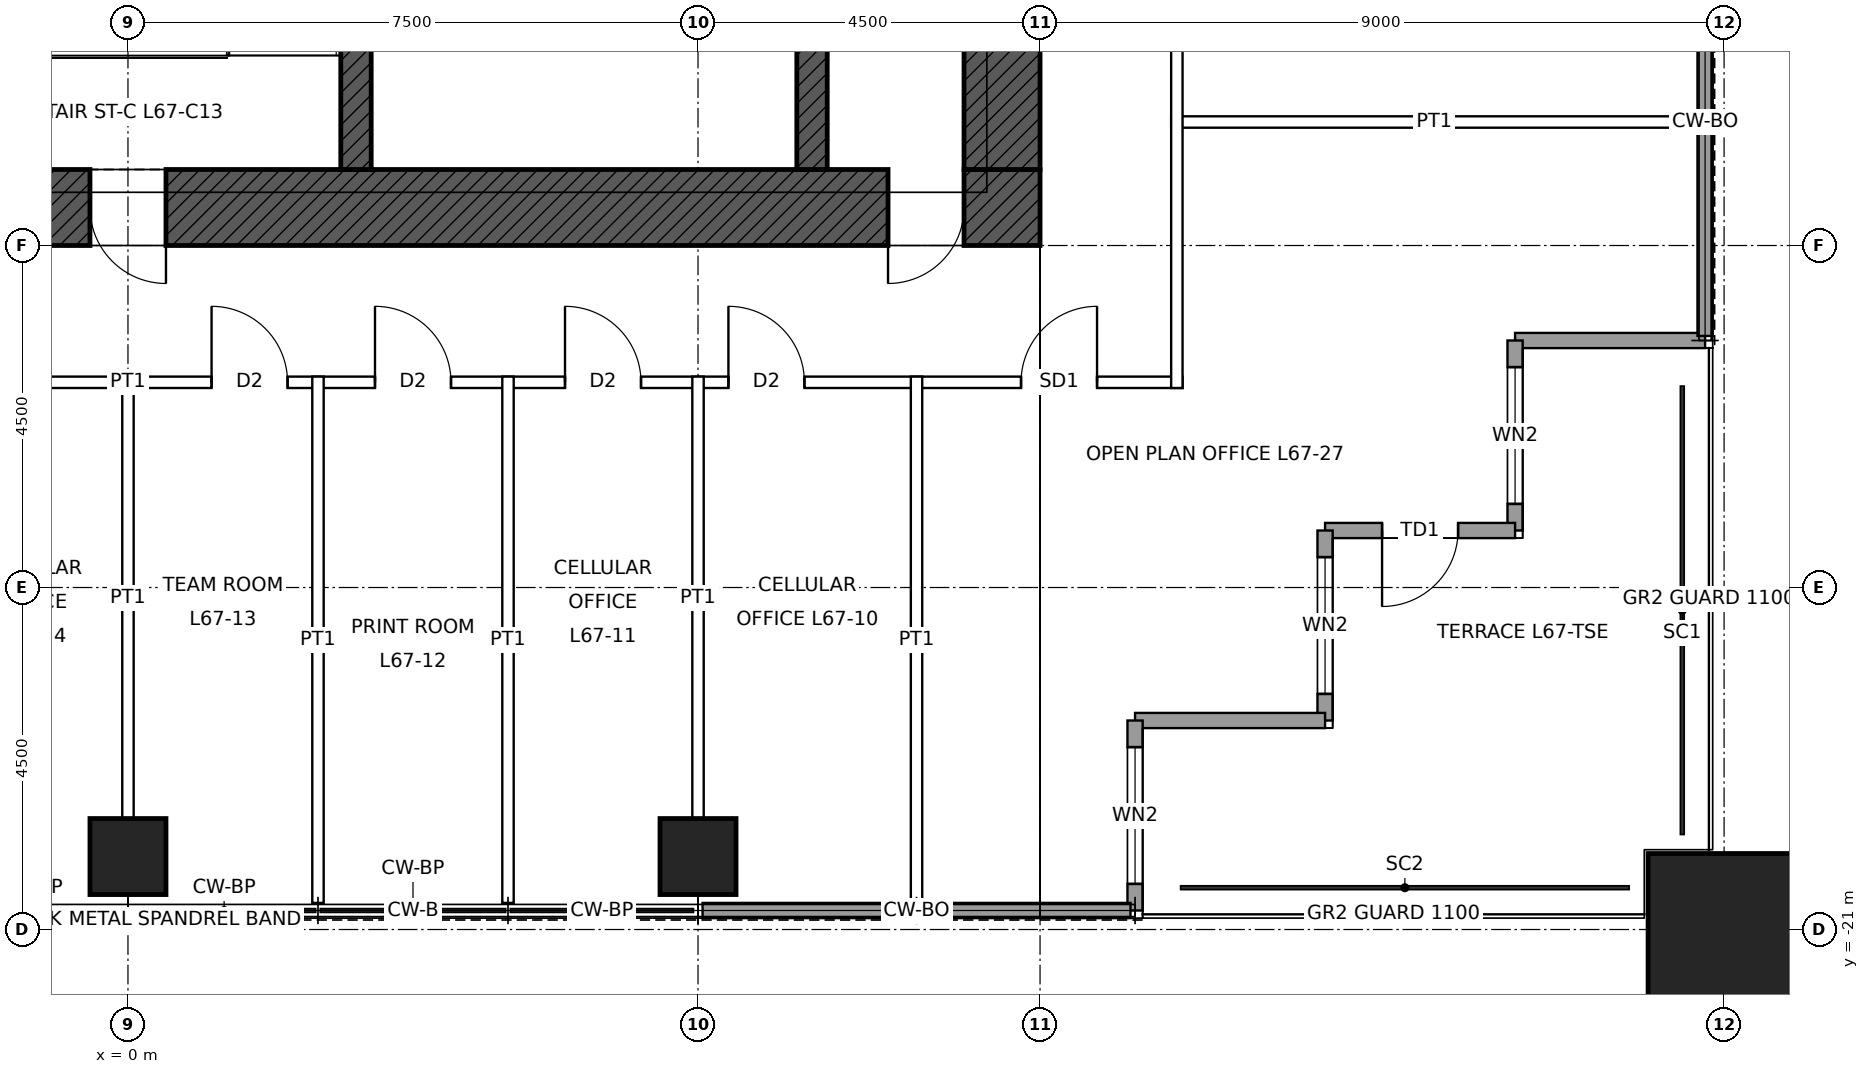
"""IFC4 building model, lengths in metres.
Left out: names, types, materials, properties, quantities, classifications, styles, units other than length and angle.
Written with IfcOpenShell. Run it as: python <this file> out.ifc"""

import sys

from ifc_helpers import new_model, si_unit, direction, frame, frame_2d, origin, origin_2d, place, context, subcontext, project, spatial, rectangle, hollow_rectangle, extrude, element, fill, save


model = new_model("IFC4")
c1 = context("Model", 3, precision=1e-05, world=origin(), true_north=direction((0.0, 1.0)))
c2 = subcontext(c1, "Body", "Model", "MODEL_VIEW")
j1 = project(units=[si_unit("LENGTHUNIT", "METRE"), si_unit("PLANEANGLEUNIT", "RADIAN")], contexts=[c1])
p1 = place(None, origin())
s1 = spatial("IfcSite", under=j1, at=p1, CompositionType="ELEMENT")
p2 = place(p1, origin())
s2 = spatial("IfcBuilding", under=s1, at=p2, CompositionType="ELEMENT")
p3 = place(p2, frame((0.0, 0.0, 303.9)))
s3 = spatial("IfcBuildingStorey", under=s2, at=p3, CompositionType="ELEMENT", Elevation=303.9)
p4 = place(p3, frame((21.0, -21.0, 0.0), z_axis=(0.0, 0.0, 1.0), x_axis=(1.0, 0.0, 0.0)))
e1 = element("IfcColumn", 1, at=p4, inside=s3, PredefinedType="COLUMN", context=c2, shape_type="SweptSolid", body=[
    extrude(hollow_rectangle(XDim=2.0, YDim=2.0, WallThickness=0.095, at=origin_2d()), origin(), (0.0, 0.0, 1.0), 4.0),
])
for number, where, z_axis, x_axis in (
    (2, (7.5, -20.04, 0.0), (0.0, 0.0, 1.0), (1.0, 0.0, 0.0)),
    (3, (0.0, -20.04, 0.0), (0.0, 0.0, 1.0), (1.0, 0.0, 0.0)),
):
    element("IfcColumn", number, at=place(p3, frame(where, z_axis=z_axis, x_axis=x_axis)), inside=s3, PredefinedType="COLUMN", context=c2, shape_type="SweptSolid", body=[
        extrude(hollow_rectangle(XDim=1.0, YDim=1.0, WallThickness=0.075, at=origin_2d()), origin(), (0.0, 0.0, 1.0), 4.0),
    ])
p5 = place(p3, frame((12.0, -11.5, 0.0), z_axis=(0.0, 0.0, 1.0), x_axis=(-1.0, 0.0, 0.0)))
e4 = element("IfcWall", 4, at=p5, inside=s3, PredefinedType="SHEAR", context=c2, shape_type="SweptSolid", body=[
    extrude(rectangle(XDim=24.0, YDim=1.0, at=frame_2d((12.0, 0.0))), origin(), (0.0, 0.0, 1.0), 4.0),
])
p6 = place(p5, frame((11.5, 0.0, 0.0)))
e5 = element("IfcOpeningElement", 5, at=p6, cuts=e4, PredefinedType="OPENING", context=c2, shape_type="SweptSolid", body=[
    extrude(rectangle(XDim=1.0, YDim=2.1, at=frame_2d((0.5, 1.05))), frame((0.0, 0.51, 0.0), z_axis=(0.0, -1.0, 0.0), x_axis=(1.0, 0.0, 0.0)), (0.0, 0.0, 1.0), 1.02),
])
p7 = place(p5, frame((1.0, 0.0, 0.0)))
e6 = element("IfcOpeningElement", 6, at=p7, cuts=e4, PredefinedType="OPENING", context=c2, shape_type="SweptSolid", body=[
    extrude(rectangle(XDim=1.0, YDim=2.4, at=frame_2d((0.5, 1.2))), frame((0.0, 0.51, 0.0), z_axis=(0.0, -1.0, 0.0), x_axis=(1.0, 0.0, 0.0)), (0.0, 0.0, 1.0), 1.02),
])
p8 = place(p3, frame((11.5, 11.0, 0.0), z_axis=(0.0, 0.0, 1.0), x_axis=(0.0, -1.0, 0.0)))
e7 = element("IfcWall", 7, at=p8, inside=s3, PredefinedType="SHEAR", context=c2, shape_type="SweptSolid", body=[
    extrude(rectangle(XDim=22.0, YDim=1.0, at=frame_2d((11.0, 0.0))), origin(), (0.0, 0.0, 1.0), 4.0),
])
p9 = place(p8, frame((10.5, 0.0, 0.0)))
e8 = element("IfcOpeningElement", 8, at=p9, cuts=e7, PredefinedType="OPENING", context=c2, shape_type="SweptSolid", body=[
    extrude(rectangle(XDim=1.0, YDim=2.4, at=frame_2d((0.5, 1.2))), frame((0.0, 0.51, 0.0), z_axis=(0.0, -1.0, 0.0), x_axis=(1.0, 0.0, 0.0)), (0.0, 0.0, 1.0), 1.02),
])
p10 = place(p3, frame((9.0, -11.0, 0.0), z_axis=(0.0, 0.0, 1.0), x_axis=(0.0, 1.0, 0.0)))
e9 = element("IfcWall", 9, at=p10, inside=s3, PredefinedType="SHEAR", context=c2, shape_type="SweptSolid", body=[
    extrude(rectangle(XDim=6.5, YDim=0.4, at=frame_2d((3.25, 0.0))), origin(), (0.0, 0.0, 1.0), 4.0),
])
p11 = place(p10, frame((4.25, 0.0, 0.0)))
e10 = element("IfcOpeningElement", 10, at=p11, cuts=e9, PredefinedType="OPENING", context=c2, shape_type="SweptSolid", body=[
    extrude(rectangle(XDim=1.0, YDim=2.1, at=frame_2d((0.5, 1.05))), frame((0.0, 0.21, 0.0), z_axis=(0.0, -1.0, 0.0), x_axis=(1.0, 0.0, 0.0)), (0.0, 0.0, 1.0), 0.42),
])
p12 = place(p3, frame((3.0, -11.0, 0.0), z_axis=(0.0, 0.0, 1.0), x_axis=(0.0, 1.0, 0.0)))
e11 = element("IfcWall", 11, at=p12, inside=s3, PredefinedType="SHEAR", context=c2, shape_type="SweptSolid", body=[
    extrude(rectangle(XDim=6.5, YDim=0.4, at=frame_2d((3.25, 0.0))), origin(), (0.0, 0.0, 1.0), 4.0),
])
p13 = place(p3, frame((20.75, -13.25, 0.0), z_axis=(0.0, 0.0, 1.0), x_axis=(-1.0, 0.0, 0.0)))
e12 = element("IfcWall", 12, at=p13, inside=s3, PredefinedType="SOLIDWALL", context=c2, shape_type="SweptSolid", body=[
    extrude(rectangle(XDim=2.5, YDim=0.2, at=frame_2d((1.25, 0.0))), origin(), (0.0, 0.0, 1.0), 3.85),
])
p14 = place(p3, frame((18.25, -13.25, 0.0), z_axis=(0.0, 0.0, 1.0), x_axis=(0.0, -1.0, 0.0)))
e13 = element("IfcWall", 13, at=p14, inside=s3, PredefinedType="SOLIDWALL", context=c2, shape_type="SweptSolid", body=[
    extrude(rectangle(XDim=2.5, YDim=0.2, at=frame_2d((1.25, 0.0))), origin(), (0.0, 0.0, 1.0), 3.85),
])
p15 = place(p14, frame((0.35, 0.0, 0.3)))
e14 = element("IfcOpeningElement", 14, at=p15, cuts=e13, PredefinedType="OPENING", context=c2, shape_type="SweptSolid", body=[
    extrude(rectangle(XDim=1.8, YDim=2.4, at=frame_2d((0.9, 1.2))), frame((0.0, 0.11, 0.0), z_axis=(0.0, -1.0, 0.0), x_axis=(1.0, 0.0, 0.0)), (0.0, 0.0, 1.0), 0.22),
])
p16 = place(p3, frame((18.25, -15.75, 0.0), z_axis=(0.0, 0.0, 1.0), x_axis=(-1.0, 0.0, 0.0)))
e15 = element("IfcWall", 15, at=p16, inside=s3, PredefinedType="SOLIDWALL", context=c2, shape_type="SweptSolid", body=[
    extrude(rectangle(XDim=2.5, YDim=0.2, at=frame_2d((1.25, 0.0))), origin(), (0.0, 0.0, 1.0), 3.317),
])
p17 = place(p16, frame((0.75, 0.0, 0.0)))
e16 = element("IfcOpeningElement", 16, at=p17, cuts=e15, PredefinedType="OPENING", context=c2, shape_type="SweptSolid", body=[
    extrude(rectangle(XDim=1.0, YDim=2.4, at=frame_2d((0.5, 1.2))), frame((0.0, 0.11, 0.0), z_axis=(0.0, -1.0, 0.0), x_axis=(1.0, 0.0, 0.0)), (0.0, 0.0, 1.0), 0.22),
])
p18 = place(p3, frame((15.75, -15.75, 0.0), z_axis=(0.0, 0.0, 1.0), x_axis=(0.0, -1.0, 0.0)))
e17 = element("IfcWall", 17, at=p18, inside=s3, PredefinedType="SOLIDWALL", context=c2, shape_type="SweptSolid", body=[
    extrude(rectangle(XDim=2.5, YDim=0.2, at=frame_2d((1.25, 0.0))), origin(), (0.0, 0.0, 1.0), 3.85),
])
p19 = place(p18, frame((0.35, 0.0, 0.3)))
e18 = element("IfcOpeningElement", 18, at=p19, cuts=e17, PredefinedType="OPENING", context=c2, shape_type="SweptSolid", body=[
    extrude(rectangle(XDim=1.8, YDim=2.4, at=frame_2d((0.9, 1.2))), frame((0.0, 0.11, 0.0), z_axis=(0.0, -1.0, 0.0), x_axis=(1.0, 0.0, 0.0)), (0.0, 0.0, 1.0), 0.22),
])
p20 = place(p3, frame((15.75, -18.25, 0.0), z_axis=(0.0, 0.0, 1.0), x_axis=(-1.0, 0.0, 0.0)))
e19 = element("IfcWall", 19, at=p20, inside=s3, PredefinedType="SOLIDWALL", context=c2, shape_type="SweptSolid", body=[
    extrude(rectangle(XDim=2.5, YDim=0.2, at=frame_2d((1.25, 0.0))), origin(), (0.0, 0.0, 1.0), 3.85),
])
p21 = place(p3, frame((13.25, -18.25, 0.0), z_axis=(0.0, 0.0, 1.0), x_axis=(0.0, -1.0, 0.0)))
e20 = element("IfcWall", 20, at=p21, inside=s3, PredefinedType="SOLIDWALL", context=c2, shape_type="SweptSolid", body=[
    extrude(rectangle(XDim=2.5, YDim=0.2, at=frame_2d((1.25, 0.0))), origin(), (0.0, 0.0, 1.0), 3.85),
])
p22 = place(p21, frame((0.35, 0.0, 0.3)))
e21 = element("IfcOpeningElement", 21, at=p22, cuts=e20, PredefinedType="OPENING", context=c2, shape_type="SweptSolid", body=[
    extrude(rectangle(XDim=1.8, YDim=2.4, at=frame_2d((0.9, 1.2))), frame((0.0, 0.11, 0.0), z_axis=(0.0, -1.0, 0.0), x_axis=(1.0, 0.0, 0.0)), (0.0, 0.0, 1.0), 0.22),
])
for number, where, z_axis, x_axis in (
    (22, (20.75, -7.56, 0.0), (0.0, 0.0, 1.0), (0.0, -1.0, 0.0)),
    (23, (20.75, -10.405, 0.0), (0.0, 0.0, 1.0), (0.0, -1.0, 0.0)),
    (24, (13.19, -20.75, 0.0), (0.0, 0.0, 1.0), (-1.0, 0.0, 0.0)),
    (25, (10.345, -20.75, 0.0), (0.0, 0.0, 1.0), (-1.0, 0.0, 0.0)),
):
    element("IfcWall", number, at=place(p3, frame(where, z_axis=z_axis, x_axis=x_axis)), inside=s3, PredefinedType="SOLIDWALL", context=c2, shape_type="SweptSolid", body=[
        extrude(rectangle(XDim=2.785, YDim=0.2, at=frame_2d((1.393, 0.0))), origin(), (0.0, 0.0, 1.0), 3.85),
    ])
p23 = place(p3, frame((-13.875, -13.8, 0.0), z_axis=(0.0, 0.0, 1.0), x_axis=(1.0, 0.0, 0.0)))
e26 = element("IfcWall", 26, at=p23, inside=s3, PredefinedType="PARTITIONING", context=c2, shape_type="SweptSolid", body=[
    extrude(rectangle(XDim=27.75, YDim=0.15, at=frame_2d((13.875, 0.0))), origin(), (0.0, 0.0, 1.0), 3.85),
])
p24 = place(p23, frame((21.775, 0.0, 0.0)))
e27 = element("IfcOpeningElement", 27, at=p24, cuts=e26, PredefinedType="OPENING", context=c2, shape_type="SweptSolid", body=[
    extrude(rectangle(XDim=1.0, YDim=2.1, at=frame_2d((0.5, 1.05))), frame((0.0, 0.085, 0.0), z_axis=(0.0, -1.0, 0.0), x_axis=(1.0, 0.0, 0.0)), (0.0, 0.0, 1.0), 0.17),
])
p25 = place(p23, frame((19.625, 0.0, 0.0)))
e28 = element("IfcOpeningElement", 28, at=p25, cuts=e26, PredefinedType="OPENING", context=c2, shape_type="SweptSolid", body=[
    extrude(rectangle(XDim=1.0, YDim=2.1, at=frame_2d((0.5, 1.05))), frame((0.0, 0.085, 0.0), z_axis=(0.0, -1.0, 0.0), x_axis=(1.0, 0.0, 0.0)), (0.0, 0.0, 1.0), 0.17),
])
p26 = place(p23, frame((17.125, 0.0, 0.0)))
e29 = element("IfcOpeningElement", 29, at=p26, cuts=e26, PredefinedType="OPENING", context=c2, shape_type="SweptSolid", body=[
    extrude(rectangle(XDim=1.0, YDim=2.1, at=frame_2d((0.5, 1.05))), frame((0.0, 0.085, 0.0), z_axis=(0.0, -1.0, 0.0), x_axis=(1.0, 0.0, 0.0)), (0.0, 0.0, 1.0), 0.17),
])
p27 = place(p23, frame((14.975, 0.0, 0.0)))
e30 = element("IfcOpeningElement", 30, at=p27, cuts=e26, PredefinedType="OPENING", context=c2, shape_type="SweptSolid", body=[
    extrude(rectangle(XDim=1.0, YDim=2.1, at=frame_2d((0.5, 1.05))), frame((0.0, 0.085, 0.0), z_axis=(0.0, -1.0, 0.0), x_axis=(1.0, 0.0, 0.0)), (0.0, 0.0, 1.0), 0.17),
])
p28 = place(p23, frame((11.775, 0.0, 0.0)))
e31 = element("IfcOpeningElement", 31, at=p28, cuts=e26, PredefinedType="OPENING", context=c2, shape_type="SweptSolid", body=[
    extrude(rectangle(XDim=1.0, YDim=2.1, at=frame_2d((0.5, 1.05))), frame((0.0, 0.085, 0.0), z_axis=(0.0, -1.0, 0.0), x_axis=(1.0, 0.0, 0.0)), (0.0, 0.0, 1.0), 0.17),
])
p29 = place(p23, frame((9.625, 0.0, 0.0)))
e32 = element("IfcOpeningElement", 32, at=p29, cuts=e26, PredefinedType="OPENING", context=c2, shape_type="SweptSolid", body=[
    extrude(rectangle(XDim=1.0, YDim=2.1, at=frame_2d((0.5, 1.05))), frame((0.0, 0.085, 0.0), z_axis=(0.0, -1.0, 0.0), x_axis=(1.0, 0.0, 0.0)), (0.0, 0.0, 1.0), 0.17),
])
p30 = place(p23, frame((7.125, 0.0, 0.0)))
e33 = element("IfcOpeningElement", 33, at=p30, cuts=e26, PredefinedType="OPENING", context=c2, shape_type="SweptSolid", body=[
    extrude(rectangle(XDim=1.0, YDim=2.1, at=frame_2d((0.5, 1.05))), frame((0.0, 0.085, 0.0), z_axis=(0.0, -1.0, 0.0), x_axis=(1.0, 0.0, 0.0)), (0.0, 0.0, 1.0), 0.17),
])
p31 = place(p23, frame((4.438, 0.0, 0.0)))
e34 = element("IfcOpeningElement", 34, at=p31, cuts=e26, PredefinedType="OPENING", context=c2, shape_type="SweptSolid", body=[
    extrude(rectangle(XDim=1.0, YDim=2.1, at=frame_2d((0.5, 1.05))), frame((0.0, 0.085, 0.0), z_axis=(0.0, -1.0, 0.0), x_axis=(1.0, 0.0, 0.0)), (0.0, 0.0, 1.0), 0.17),
])
p32 = place(p23, frame((25.625, 0.0, 0.0)))
e35 = element("IfcOpeningElement", 35, at=p32, cuts=e26, PredefinedType="OPENING", context=c2, shape_type="SweptSolid", body=[
    extrude(rectangle(XDim=1.0, YDim=2.4, at=frame_2d((0.5, 1.2))), frame((0.0, 0.085, 0.0), z_axis=(0.0, -1.0, 0.0), x_axis=(1.0, 0.0, 0.0)), (0.0, 0.0, 1.0), 0.17),
])
p33 = place(p23, frame((1.288, 0.0, 0.0)))
e36 = element("IfcOpeningElement", 36, at=p33, cuts=e26, PredefinedType="OPENING", context=c2, shape_type="SweptSolid", body=[
    extrude(rectangle(XDim=1.0, YDim=2.4, at=frame_2d((0.5, 1.2))), frame((0.0, 0.085, 0.0), z_axis=(0.0, -1.0, 0.0), x_axis=(1.0, 0.0, 0.0)), (0.0, 0.0, 1.0), 0.17),
])
p34 = place(p3, frame((13.725, -10.375, 0.0), z_axis=(0.0, 0.0, 1.0), x_axis=(1.0, 0.0, 0.0)))
e37 = element("IfcWall", 37, at=p34, inside=s3, PredefinedType="PARTITIONING", context=c2, shape_type="SweptSolid", body=[
    extrude(rectangle(XDim=6.925, YDim=0.15, at=frame_2d((3.462, 0.0))), origin(), (0.0, 0.0, 1.0), 3.85),
])
p35 = place(p3, frame((0.0, -19.54, 0.0), z_axis=(0.0, 0.0, 1.0), x_axis=(0.0, 1.0, 0.0)))
e38 = element("IfcWall", 38, at=p35, inside=s3, PredefinedType="PARTITIONING", context=c2, shape_type="SweptSolid", body=[
    extrude(rectangle(XDim=5.815, YDim=0.15, at=frame_2d((2.907, 0.0))), origin(), (0.0, 0.0, 1.0), 3.243),
])
for number, where, z_axis, x_axis in (
    (39, (2.5, -20.65, 0.0), (0.0, 0.0, 1.0), (0.0, 1.0, 0.0)),
    (40, (5.0, -20.65, 0.0), (0.0, 0.0, 1.0), (0.0, 1.0, 0.0)),
):
    element("IfcWall", number, at=place(p3, frame(where, z_axis=z_axis, x_axis=x_axis)), inside=s3, PredefinedType="PARTITIONING", context=c2, shape_type="SweptSolid", body=[
        extrude(rectangle(XDim=6.925, YDim=0.15, at=frame_2d((3.462, 0.0))), origin(), (0.0, 0.0, 1.0), 3.85),
    ])
p36 = place(p3, frame((7.5, -19.54, 0.0), z_axis=(0.0, 0.0, 1.0), x_axis=(0.0, 1.0, 0.0)))
e41 = element("IfcWall", 41, at=p36, inside=s3, PredefinedType="PARTITIONING", context=c2, shape_type="SweptSolid", body=[
    extrude(rectangle(XDim=5.815, YDim=0.15, at=frame_2d((2.907, 0.0))), origin(), (0.0, 0.0, 1.0), 3.243),
])
p37 = place(p3, frame((10.375, -20.65, 0.0), z_axis=(0.0, 0.0, 1.0), x_axis=(0.0, 1.0, 0.0)))
e42 = element("IfcWall", 42, at=p37, inside=s3, PredefinedType="PARTITIONING", context=c2, shape_type="SweptSolid", body=[
    extrude(rectangle(XDim=6.925, YDim=0.15, at=frame_2d((3.462, 0.0))), origin(), (0.0, 0.0, 1.0), 3.85),
])
p38 = place(p3, frame((13.8, -13.875, 0.0), z_axis=(0.0, 0.0, 1.0), x_axis=(0.0, 1.0, 0.0)))
e43 = element("IfcWall", 43, at=p38, inside=s3, PredefinedType="PARTITIONING", context=c2, shape_type="SweptSolid", body=[
    extrude(rectangle(XDim=13.95, YDim=0.15, at=frame_2d((6.975, 0.0))), origin(), (0.0, 0.0, 1.0), 3.85),
])
p39 = place(p38, frame((11.775, 0.0, 0.0)))
e44 = element("IfcOpeningElement", 44, at=p39, cuts=e43, PredefinedType="OPENING", context=c2, shape_type="SweptSolid", body=[
    extrude(rectangle(XDim=1.0, YDim=2.1, at=frame_2d((0.5, 1.05))), frame((0.0, 0.085, 0.0), z_axis=(0.0, -1.0, 0.0), x_axis=(1.0, 0.0, 0.0)), (0.0, 0.0, 1.0), 0.17),
])
p40 = place(p38, frame((9.625, 0.0, 0.0)))
e45 = element("IfcOpeningElement", 45, at=p40, cuts=e43, PredefinedType="OPENING", context=c2, shape_type="SweptSolid", body=[
    extrude(rectangle(XDim=1.0, YDim=2.1, at=frame_2d((0.5, 1.05))), frame((0.0, 0.085, 0.0), z_axis=(0.0, -1.0, 0.0), x_axis=(1.0, 0.0, 0.0)), (0.0, 0.0, 1.0), 0.17),
])
p41 = place(p38, frame((5.688, 0.0, 0.0)))
e46 = element("IfcOpeningElement", 46, at=p41, cuts=e43, PredefinedType="OPENING", context=c2, shape_type="SweptSolid", body=[
    extrude(rectangle(XDim=1.0, YDim=2.1, at=frame_2d((0.5, 1.05))), frame((0.0, 0.085, 0.0), z_axis=(0.0, -1.0, 0.0), x_axis=(1.0, 0.0, 0.0)), (0.0, 0.0, 1.0), 0.17),
])
p42 = place(p15, origin())
e47 = element("IfcWindow", 47, at=p42, inside=s3, PartitioningType="SINGLE_PANEL", PredefinedType="WINDOW", context=c2, shape_type="SweptSolid", body=[
    extrude(rectangle(XDim=1.8, YDim=2.4, at=frame_2d((0.9, 1.2))), frame((0.0, 0.03, 0.0), z_axis=(0.0, -1.0, 0.0), x_axis=(1.0, 0.0, 0.0)), (0.0, 0.0, 1.0), 0.06),
])
fill(e14, e47)
p43 = place(p17, origin())
e48 = element("IfcDoor", 48, at=p43, inside=s3, OperationType="SINGLE_SWING_RIGHT", PredefinedType="DOOR", context=c2, shape_type="SweptSolid", body=[
    extrude(rectangle(XDim=1.0, YDim=2.4, at=frame_2d((0.5, 1.2))), frame((0.0, 0.025, 0.0), z_axis=(0.0, -1.0, 0.0), x_axis=(1.0, 0.0, 0.0)), (0.0, 0.0, 1.0), 0.05),
])
fill(e16, e48)
p44 = place(p19, origin())
e49 = element("IfcWindow", 49, at=p44, inside=s3, PartitioningType="SINGLE_PANEL", PredefinedType="WINDOW", context=c2, shape_type="SweptSolid", body=[
    extrude(rectangle(XDim=1.8, YDim=2.4, at=frame_2d((0.9, 1.2))), frame((0.0, 0.03, 0.0), z_axis=(0.0, -1.0, 0.0), x_axis=(1.0, 0.0, 0.0)), (0.0, 0.0, 1.0), 0.06),
])
fill(e18, e49)
p45 = place(p22, origin())
e50 = element("IfcWindow", 50, at=p45, inside=s3, PartitioningType="SINGLE_PANEL", PredefinedType="WINDOW", context=c2, shape_type="SweptSolid", body=[
    extrude(rectangle(XDim=1.8, YDim=2.4, at=frame_2d((0.9, 1.2))), frame((0.0, 0.03, 0.0), z_axis=(0.0, -1.0, 0.0), x_axis=(1.0, 0.0, 0.0)), (0.0, 0.0, 1.0), 0.06),
])
fill(e21, e50)
p46 = place(p6, origin())
e51 = element("IfcDoor", 51, at=p46, inside=s3, OperationType="SINGLE_SWING_LEFT", PredefinedType="DOOR", context=c2, shape_type="SweptSolid", body=[
    extrude(rectangle(XDim=1.0, YDim=2.1, at=frame_2d((0.5, 1.05))), frame((0.0, 0.485, 0.0), z_axis=(0.0, -1.0, 0.0), x_axis=(1.0, 0.0, 0.0)), (0.0, 0.0, 1.0), 0.05),
])
fill(e5, e51)
p47 = place(p7, origin())
e52 = element("IfcDoor", 52, at=p47, inside=s3, OperationType="SINGLE_SWING_RIGHT", PredefinedType="DOOR", context=c2, shape_type="SweptSolid", body=[
    extrude(rectangle(XDim=1.0, YDim=2.4, at=frame_2d((0.5, 1.2))), frame((0.0, 0.485, 0.0), z_axis=(0.0, -1.0, 0.0), x_axis=(1.0, 0.0, 0.0)), (0.0, 0.0, 1.0), 0.05),
])
fill(e6, e52)
p48 = place(p24, origin())
e53 = element("IfcDoor", 53, at=p48, inside=s3, OperationType="SINGLE_SWING_LEFT", PredefinedType="DOOR", context=c2, shape_type="SweptSolid", body=[
    extrude(rectangle(XDim=1.0, YDim=2.1, at=frame_2d((0.5, 1.05))), frame((0.0, 0.025, 0.0), z_axis=(0.0, -1.0, 0.0), x_axis=(1.0, 0.0, 0.0)), (0.0, 0.0, 1.0), 0.05),
])
fill(e27, e53)
p49 = place(p25, origin())
e54 = element("IfcDoor", 54, at=p49, inside=s3, OperationType="SINGLE_SWING_LEFT", PredefinedType="DOOR", context=c2, shape_type="SweptSolid", body=[
    extrude(rectangle(XDim=1.0, YDim=2.1, at=frame_2d((0.5, 1.05))), frame((0.0, 0.025, 0.0), z_axis=(0.0, -1.0, 0.0), x_axis=(1.0, 0.0, 0.0)), (0.0, 0.0, 1.0), 0.05),
])
fill(e28, e54)
p50 = place(p26, origin())
e55 = element("IfcDoor", 55, at=p50, inside=s3, OperationType="SINGLE_SWING_LEFT", PredefinedType="DOOR", context=c2, shape_type="SweptSolid", body=[
    extrude(rectangle(XDim=1.0, YDim=2.1, at=frame_2d((0.5, 1.05))), frame((0.0, 0.025, 0.0), z_axis=(0.0, -1.0, 0.0), x_axis=(1.0, 0.0, 0.0)), (0.0, 0.0, 1.0), 0.05),
])
fill(e29, e55)
p51 = place(p27, origin())
e56 = element("IfcDoor", 56, at=p51, inside=s3, OperationType="SINGLE_SWING_LEFT", PredefinedType="DOOR", context=c2, shape_type="SweptSolid", body=[
    extrude(rectangle(XDim=1.0, YDim=2.1, at=frame_2d((0.5, 1.05))), frame((0.0, 0.025, 0.0), z_axis=(0.0, -1.0, 0.0), x_axis=(1.0, 0.0, 0.0)), (0.0, 0.0, 1.0), 0.05),
])
fill(e30, e56)
p52 = place(p32, origin())
e57 = element("IfcDoor", 57, at=p52, inside=s3, OperationType="SINGLE_SWING_RIGHT", PredefinedType="DOOR", context=c2, shape_type="SweptSolid", body=[
    extrude(rectangle(XDim=1.0, YDim=2.4, at=frame_2d((0.5, 1.2))), frame((0.0, 0.025, 0.0), z_axis=(0.0, -1.0, 0.0), x_axis=(1.0, 0.0, 0.0)), (0.0, 0.0, 1.0), 0.05),
])
fill(e35, e57)
save(model, sys.argv[1])
